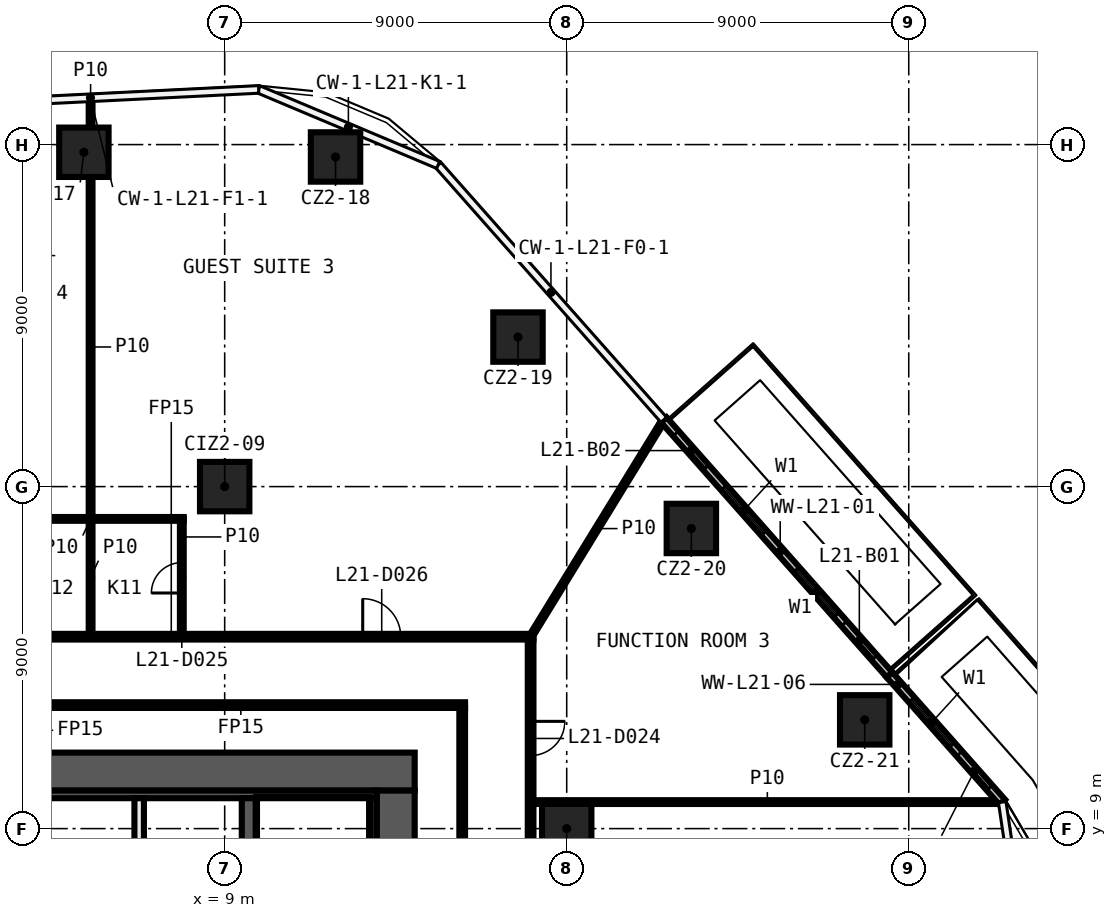
"""IFC4 building model, lengths in metres.
Left out: names, types, materials, properties, quantities, classifications, styles, units other than length and angle.
Written with IfcOpenShell. Run it as: python <this file> out.ifc"""

import sys

from ifc_helpers import new_model, si_unit, direction, frame, frame_2d, origin, origin_2d, place, context, subcontext, project, spatial, rectangle, extrude, element, fill, save


model = new_model("IFC4")
c1 = context("Model", 3, precision=1e-05, world=origin(), true_north=direction((0.0, 1.0)))
c2 = subcontext(c1, "Body", "Model", "MODEL_VIEW")
j1 = project(units=[si_unit("LENGTHUNIT", "METRE"), si_unit("PLANEANGLEUNIT", "RADIAN")], contexts=[c1])
p1 = place(None, origin())
s1 = spatial("IfcSite", under=j1, at=p1, CompositionType="ELEMENT")
p2 = place(p1, origin())
s2 = spatial("IfcBuilding", under=s1, at=p2, CompositionType="ELEMENT")
p3 = place(p2, frame((0.0, 0.0, 102.6)))
s3 = spatial("IfcBuildingStorey", under=s2, at=p3, CompositionType="ELEMENT", Elevation=102.6)
for number, where, z_axis, x_axis in (
    (1, (5.295, 26.798, 0.0), (0.0, 0.0, 1.0), (1.0, 0.0, 0.0)),
    (2, (11.917, 26.674, 0.0), (0.0, 0.0, 1.0), (1.0, 0.0, 0.0)),
    (3, (16.718, 21.935, 0.0), (0.0, 0.0, 1.0), (1.0, 0.0, 0.0)),
    (4, (21.28, 16.898, 0.0), (0.0, 0.0, 1.0), (1.0, 0.0, 0.0)),
    (5, (25.841, 11.862, 0.0), (0.0, 0.0, 1.0), (1.0, 0.0, 0.0)),
    (6, (9.0, 18.0, 0.0), (0.0, 0.0, 1.0), (1.0, 0.0, 0.0)),
    (7, (18.0, 9.0, 0.0), (0.0, 0.0, 1.0), (1.0, 0.0, 0.0)),
):
    element("IfcColumn", number, at=place(p3, frame(where, z_axis=z_axis, x_axis=x_axis)), inside=s3, PredefinedType="COLUMN", context=c2, shape_type="SweptSolid", body=[
        extrude(rectangle(XDim=1.3, YDim=1.3, at=origin_2d()), origin(), (0.0, 0.0, 1.0), 3.3),
    ])
p4 = place(p3, frame((17.125, 9.698, 0.0), z_axis=(0.0, 0.0, 1.0), x_axis=(1.0, 0.0, 0.0)))
e8 = element("IfcWall", 8, at=p4, inside=s3, PredefinedType="PARTITIONING", context=c2, shape_type="SweptSolid", body=[
    extrude(rectangle(XDim=12.308, YDim=0.1, at=frame_2d((6.154, 0.0))), origin(), (0.0, 0.0, 1.0), 3.3),
])
p5 = place(p3, frame((3.525, 12.25, 0.0), z_axis=(0.0, 0.0, 1.0), x_axis=(1.0, 0.0, 0.0)))
e9 = element("IfcWall", 9, at=p5, inside=s3, PredefinedType="PARTITIONING", context=c2, shape_type="SweptSolid", body=[
    extrude(rectangle(XDim=11.8, YDim=0.15, at=frame_2d((5.9, 0.0))), origin(), (0.0, 0.0, 1.0), 3.3),
])
p6 = place(p3, frame((-17.125, 14.05, 0.0), z_axis=(0.0, 0.0, 1.0), x_axis=(1.0, 0.0, 0.0)))
e10 = element("IfcWall", 10, at=p6, inside=s3, PredefinedType="PARTITIONING", context=c2, shape_type="SweptSolid", body=[
    extrude(rectangle(XDim=34.25, YDim=0.15, at=frame_2d((17.125, 0.0))), origin(), (0.0, 0.0, 1.0), 3.3),
])
p7 = place(p6, frame((29.757, 0.0, 0.0)))
e11 = element("IfcOpeningElement", 11, at=p7, cuts=e10, PredefinedType="OPENING", context=c2, shape_type="SweptSolid", body=[
    extrude(rectangle(XDim=1.0, YDim=2.1, at=frame_2d((0.5, 1.05))), frame((0.0, 0.085, 0.0), z_axis=(0.0, -1.0, 0.0), x_axis=(1.0, 0.0, 0.0)), (0.0, 0.0, 1.0), 0.17),
])
p8 = place(p6, frame((18.682, 0.0, 0.0)))
e12 = element("IfcOpeningElement", 12, at=p8, cuts=e10, PredefinedType="OPENING", context=c2, shape_type="SweptSolid", body=[
    extrude(rectangle(XDim=1.0, YDim=2.1, at=frame_2d((0.5, 1.05))), frame((0.0, 0.085, 0.0), z_axis=(0.0, -1.0, 0.0), x_axis=(1.0, 0.0, 0.0)), (0.0, 0.0, 1.0), 0.17),
])
p9 = place(p6, frame((16.654, 0.0, 0.0)))
e13 = element("IfcOpeningElement", 13, at=p9, cuts=e10, PredefinedType="OPENING", context=c2, shape_type="SweptSolid", body=[
    extrude(rectangle(XDim=1.0, YDim=2.1, at=frame_2d((0.5, 1.05))), frame((0.0, 0.085, 0.0), z_axis=(0.0, -1.0, 0.0), x_axis=(1.0, 0.0, 0.0)), (0.0, 0.0, 1.0), 0.17),
])
p10 = place(p6, frame((9.827, 0.0, 0.0)))
e14 = element("IfcOpeningElement", 14, at=p10, cuts=e10, PredefinedType="OPENING", context=c2, shape_type="SweptSolid", body=[
    extrude(rectangle(XDim=1.0, YDim=2.1, at=frame_2d((0.5, 1.05))), frame((0.0, 0.085, 0.0), z_axis=(0.0, -1.0, 0.0), x_axis=(1.0, 0.0, 0.0)), (0.0, 0.0, 1.0), 0.17),
])
p11 = place(p6, frame((7.8, 0.0, 0.0)))
e15 = element("IfcOpeningElement", 15, at=p11, cuts=e10, PredefinedType="OPENING", context=c2, shape_type="SweptSolid", body=[
    extrude(rectangle(XDim=1.0, YDim=2.1, at=frame_2d((0.5, 1.05))), frame((0.0, 0.085, 0.0), z_axis=(0.0, -1.0, 0.0), x_axis=(1.0, 0.0, 0.0)), (0.0, 0.0, 1.0), 0.17),
])
p12 = place(p6, frame((2.56, 0.0, 0.0)))
e16 = element("IfcOpeningElement", 16, at=p12, cuts=e10, PredefinedType="OPENING", context=c2, shape_type="SweptSolid", body=[
    extrude(rectangle(XDim=0.9, YDim=2.1, at=frame_2d((0.45, 1.05))), frame((0.0, 0.085, 0.0), z_axis=(0.0, -1.0, 0.0), x_axis=(1.0, 0.0, 0.0)), (0.0, 0.0, 1.0), 0.17),
])
p13 = place(p3, frame((3.022, 17.15, 0.0), z_axis=(0.0, 0.0, 1.0), x_axis=(1.0, 0.0, 0.0)))
e17 = element("IfcWall", 17, at=p13, inside=s3, PredefinedType="PARTITIONING", context=c2, shape_type="SweptSolid", body=[
    extrude(rectangle(XDim=4.9, YDim=0.1, at=frame_2d((2.45, 0.0))), origin(), (0.0, 0.0, 1.0), 3.3),
])
p14 = place(p3, frame((17.05, 14.05, 0.0), z_axis=(0.0, 0.0, 1.0), x_axis=(0.523105565691, 0.852267896346, 0.0)))
e18 = element("IfcWall", 18, at=p14, inside=s3, PredefinedType="PARTITIONING", context=c2, shape_type="SweptSolid", body=[
    extrude(rectangle(XDim=6.677, YDim=0.1, at=frame_2d((3.338, 0.0))), origin(), (0.0, 0.0, 1.0), 3.3),
])
p15 = place(p3, frame((17.05, 13.975, 0.0), z_axis=(0.0, 0.0, 1.0), x_axis=(0.0, -1.0, 0.0)))
e19 = element("IfcWall", 19, at=p15, inside=s3, PredefinedType="PARTITIONING", context=c2, shape_type="SweptSolid", body=[
    extrude(rectangle(XDim=27.95, YDim=0.15, at=frame_2d((13.975, 0.0))), origin(), (0.0, 0.0, 1.0), 3.3),
])
p16 = place(p15, frame((25.274, 0.0, 0.0)))
e20 = element("IfcOpeningElement", 20, at=p16, cuts=e19, PredefinedType="OPENING", context=c2, shape_type="SweptSolid", body=[
    extrude(rectangle(XDim=0.9, YDim=2.1, at=frame_2d((0.45, 1.05))), frame((0.0, 0.085, 0.0), z_axis=(0.0, -1.0, 0.0), x_axis=(1.0, 0.0, 0.0)), (0.0, 0.0, 1.0), 0.17),
])
p17 = place(p15, frame((18.854, 0.0, 0.0)))
e21 = element("IfcOpeningElement", 21, at=p17, cuts=e19, PredefinedType="OPENING", context=c2, shape_type="SweptSolid", body=[
    extrude(rectangle(XDim=1.0, YDim=2.1, at=frame_2d((0.5, 1.05))), frame((0.0, 0.085, 0.0), z_axis=(0.0, -1.0, 0.0), x_axis=(1.0, 0.0, 0.0)), (0.0, 0.0, 1.0), 0.17),
])
p18 = place(p15, frame((17.299, 0.0, 0.0)))
e22 = element("IfcOpeningElement", 22, at=p18, cuts=e19, PredefinedType="OPENING", context=c2, shape_type="SweptSolid", body=[
    extrude(rectangle(XDim=1.0, YDim=2.1, at=frame_2d((0.5, 1.05))), frame((0.0, 0.085, 0.0), z_axis=(0.0, -1.0, 0.0), x_axis=(1.0, 0.0, 0.0)), (0.0, 0.0, 1.0), 0.17),
])
p19 = place(p15, frame((11.171, 0.0, 0.0)))
e23 = element("IfcOpeningElement", 23, at=p19, cuts=e19, PredefinedType="OPENING", context=c2, shape_type="SweptSolid", body=[
    extrude(rectangle(XDim=0.9, YDim=2.1, at=frame_2d((0.45, 1.05))), frame((0.0, 0.085, 0.0), z_axis=(0.0, -1.0, 0.0), x_axis=(1.0, 0.0, 0.0)), (0.0, 0.0, 1.0), 0.17),
])
p20 = place(p15, frame((7.243, 0.0, 0.0)))
e24 = element("IfcOpeningElement", 24, at=p20, cuts=e19, PredefinedType="OPENING", context=c2, shape_type="SweptSolid", body=[
    extrude(rectangle(XDim=0.9, YDim=2.1, at=frame_2d((0.45, 1.05))), frame((0.0, 0.085, 0.0), z_axis=(0.0, -1.0, 0.0), x_axis=(1.0, 0.0, 0.0)), (0.0, 0.0, 1.0), 0.17),
])
p21 = place(p15, frame((2.153, 0.0, 0.0)))
e25 = element("IfcOpeningElement", 25, at=p21, cuts=e19, PredefinedType="OPENING", context=c2, shape_type="SweptSolid", body=[
    extrude(rectangle(XDim=0.9, YDim=2.1, at=frame_2d((0.45, 1.05))), frame((0.0, 0.085, 0.0), z_axis=(0.0, -1.0, 0.0), x_axis=(1.0, 0.0, 0.0)), (0.0, 0.0, 1.0), 0.17),
])
p22 = place(p3, frame((15.25, -12.175, 0.0), z_axis=(0.0, 0.0, 1.0), x_axis=(0.0, 1.0, 0.0)))
e26 = element("IfcWall", 26, at=p22, inside=s3, PredefinedType="PARTITIONING", context=c2, shape_type="SweptSolid", body=[
    extrude(rectangle(XDim=24.35, YDim=0.15, at=frame_2d((12.175, 0.0))), origin(), (0.0, 0.0, 1.0), 3.3),
])
p23 = place(p22, frame((11.725, 0.0, 0.0)))
e27 = element("IfcOpeningElement", 27, at=p23, cuts=e26, PredefinedType="OPENING", context=c2, shape_type="SweptSolid", body=[
    extrude(rectangle(XDim=0.9, YDim=2.1, at=frame_2d((0.45, 1.05))), frame((0.0, 0.085, 0.0), z_axis=(0.0, -1.0, 0.0), x_axis=(1.0, 0.0, 0.0)), (0.0, 0.0, 1.0), 0.17),
])
p24 = place(p3, frame((7.872, 14.125, 0.0), z_axis=(0.0, 0.0, 1.0), x_axis=(0.0, 1.0, 0.0)))
e28 = element("IfcWall", 28, at=p24, inside=s3, PredefinedType="PARTITIONING", context=c2, shape_type="SweptSolid", body=[
    extrude(rectangle(XDim=3.025, YDim=0.1, at=frame_2d((1.512, 0.0))), origin(), (0.0, 0.0, 1.0), 3.3),
])
p25 = place(p24, frame((1.075, 0.0, 0.0)))
e29 = element("IfcOpeningElement", 29, at=p25, cuts=e28, PredefinedType="OPENING", context=c2, shape_type="SweptSolid", body=[
    extrude(rectangle(XDim=0.8, YDim=2.1, at=frame_2d((0.4, 1.05))), frame((0.0, 0.06, 0.0), z_axis=(0.0, -1.0, 0.0), x_axis=(1.0, 0.0, 0.0)), (0.0, 0.0, 1.0), 0.12),
])
p26 = place(p3, frame((5.472, 14.125, 0.0), z_axis=(0.0, 0.0, 1.0), x_axis=(0.0, 1.0, 0.0)))
e30 = element("IfcWall", 30, at=p26, inside=s3, PredefinedType="PARTITIONING", context=c2, shape_type="SweptSolid", body=[
    extrude(rectangle(XDim=2.975, YDim=0.1, at=frame_2d((1.488, 0.0))), origin(), (0.0, 0.0, 1.0), 3.3),
])
p27 = place(p3, frame((5.472, 17.2, 0.0), z_axis=(0.0, 0.0, 1.0), x_axis=(0.0, 1.0, 0.0)))
e31 = element("IfcWall", 31, at=p27, inside=s3, PredefinedType="PARTITIONING", context=c2, shape_type="SweptSolid", body=[
    extrude(rectangle(XDim=8.948, YDim=0.1, at=frame_2d((4.474, 0.0))), origin(), (0.0, 0.0, 1.0), 3.3),
])
p28 = place(p3, frame((5.472, 27.448, 0.0), z_axis=(0.0, 0.0, 1.0), x_axis=(0.0, 1.0, 0.0)))
e32 = element("IfcWall", 32, at=p28, inside=s3, PredefinedType="PARTITIONING", context=c2, shape_type="SweptSolid", body=[
    extrude(rectangle(XDim=0.764, YDim=0.1, at=frame_2d((0.382, 0.0))), origin(), (0.0, 0.0, 1.0), 3.3),
])
p29 = place(p3, frame((26.495, 13.046, 0.0), z_axis=(0.0, 0.0, 1.0), x_axis=(-0.662851206757, 0.748751145376, 0.0)))
e33 = element("IfcWall", 33, at=p29, inside=s3, PredefinedType="SOLIDWALL", context=c2, shape_type="SweptSolid", body=[
    extrude(rectangle(XDim=8.964, YDim=0.2, at=frame_2d((4.482, 0.0))), origin(), (0.0, 0.0, 1.0), 3.25),
])
p30 = place(p29, frame((2.1, 0.0, 0.6)))
e34 = element("IfcOpeningElement", 34, at=p30, cuts=e33, PredefinedType="OPENING", context=c2, shape_type="SweptSolid", body=[
    extrude(rectangle(XDim=1.6, YDim=2.4, at=frame_2d((0.8, 1.2))), frame((0.0, 0.11, 0.0), z_axis=(0.0, -1.0, 0.0), x_axis=(1.0, 0.0, 0.0)), (0.0, 0.0, 1.0), 0.22),
])
p31 = place(p29, frame((0.6, 0.0, 0.0)))
e35 = element("IfcOpeningElement", 35, at=p31, cuts=e33, PredefinedType="OPENING", context=c2, shape_type="SweptSolid", body=[
    extrude(rectangle(XDim=1.2, YDim=2.4, at=frame_2d((0.6, 1.2))), frame((0.0, 0.11, 0.0), z_axis=(0.0, -1.0, 0.0), x_axis=(1.0, 0.0, 0.0)), (0.0, 0.0, 1.0), 0.22),
])
p32 = place(p29, frame((4.982, 0.0, 0.6)))
e36 = element("IfcOpeningElement", 36, at=p32, cuts=e33, PredefinedType="OPENING", context=c2, shape_type="SweptSolid", body=[
    extrude(rectangle(XDim=1.6, YDim=2.4, at=frame_2d((0.8, 1.2))), frame((0.0, 0.11, 0.0), z_axis=(0.0, -1.0, 0.0), x_axis=(1.0, 0.0, 0.0)), (0.0, 0.0, 1.0), 0.22),
])
p33 = place(p29, frame((7.282, 0.0, 0.0)))
e37 = element("IfcOpeningElement", 37, at=p33, cuts=e33, PredefinedType="OPENING", context=c2, shape_type="SweptSolid", body=[
    extrude(rectangle(XDim=1.2, YDim=2.4, at=frame_2d((0.6, 1.2))), frame((0.0, 0.11, 0.0), z_axis=(0.0, -1.0, 0.0), x_axis=(1.0, 0.0, 0.0)), (0.0, 0.0, 1.0), 0.22),
])
p34 = place(p3, frame((29.46, 9.698, 0.0), z_axis=(0.0, 0.0, 1.0), x_axis=(-0.662868291848, 0.748736020011, 0.0)))
e38 = element("IfcWall", 38, at=p34, inside=s3, PredefinedType="SOLIDWALL", context=c2, shape_type="SweptSolid", body=[
    extrude(rectangle(XDim=4.472, YDim=0.2, at=frame_2d((2.236, 0.0))), origin(), (0.0, 0.0, 1.0), 3.25),
])
p35 = place(p34, frame((2.0, 0.0, 0.6)))
e39 = element("IfcOpeningElement", 39, at=p35, cuts=e38, PredefinedType="OPENING", context=c2, shape_type="SweptSolid", body=[
    extrude(rectangle(XDim=1.6, YDim=2.4, at=frame_2d((0.8, 1.2))), frame((0.0, 0.11, 0.0), z_axis=(0.0, -1.0, 0.0), x_axis=(1.0, 0.0, 0.0)), (0.0, 0.0, 1.0), 0.22),
])
p36 = place(p34, frame((0.5, 0.0, 0.0)))
e40 = element("IfcOpeningElement", 40, at=p36, cuts=e38, PredefinedType="OPENING", context=c2, shape_type="SweptSolid", body=[
    extrude(rectangle(XDim=1.2, YDim=2.4, at=frame_2d((0.6, 1.2))), frame((0.0, 0.11, 0.0), z_axis=(0.0, -1.0, 0.0), x_axis=(1.0, 0.0, 0.0)), (0.0, 0.0, 1.0), 0.22),
])
p37 = place(p3, frame((-14.0, 10.5, 0.0), z_axis=(0.0, 0.0, 1.0), x_axis=(1.0, 0.0, 0.0)))
e41 = element("IfcWall", 41, at=p37, inside=s3, PredefinedType="SHEAR", context=c2, shape_type="SweptSolid", body=[
    extrude(rectangle(XDim=28.0, YDim=1.0, at=frame_2d((14.0, 0.0))), origin(), (0.0, 0.0, 1.0), 3.3),
])
p38 = place(p37, frame((15.9, 0.0, 0.0)))
e42 = element("IfcOpeningElement", 42, at=p38, cuts=e41, PredefinedType="OPENING", context=c2, shape_type="SweptSolid", body=[
    extrude(rectangle(XDim=1.6, YDim=2.1, at=frame_2d((0.8, 1.05))), frame((0.0, 0.51, 0.0), z_axis=(0.0, -1.0, 0.0), x_axis=(1.0, 0.0, 0.0)), (0.0, 0.0, 1.0), 1.02),
])
p39 = place(p3, frame((13.5, 10.0, 0.0), z_axis=(0.0, 0.0, 1.0), x_axis=(0.0, -1.0, 0.0)))
e43 = element("IfcWall", 43, at=p39, inside=s3, PredefinedType="SHEAR", context=c2, shape_type="SweptSolid", body=[
    extrude(rectangle(XDim=20.0, YDim=1.0, at=frame_2d((10.0, 0.0))), origin(), (0.0, 0.0, 1.0), 3.3),
])
p40 = place(p3, frame((3.9, 9.9, 0.0), z_axis=(0.0, 0.0, 1.0), x_axis=(1.0, 0.0, 0.0)))
e44 = element("IfcWall", 44, at=p40, inside=s3, PredefinedType="SHEAR", context=c2, shape_type="SweptSolid", body=[
    extrude(rectangle(XDim=9.1, YDim=0.2, at=frame_2d((4.55, 0.0))), origin(), (0.0, 0.0, 1.0), 3.3),
])
p41 = place(p3, frame((12.9, 9.8, 0.0), z_axis=(0.0, 0.0, 1.0), x_axis=(0.0, -1.0, 0.0)))
e45 = element("IfcWall", 45, at=p41, inside=s3, PredefinedType="SHEAR", context=c2, shape_type="SweptSolid", body=[
    extrude(rectangle(XDim=19.6, YDim=0.2, at=frame_2d((9.8, 0.0))), origin(), (0.0, 0.0, 1.0), 3.3),
])
p42 = place(p3, frame((9.65, 9.8, 0.0), z_axis=(0.0, 0.0, 1.0), x_axis=(0.0, -1.0, 0.0)))
e46 = element("IfcWall", 46, at=p42, inside=s3, PredefinedType="SHEAR", context=c2, shape_type="SweptSolid", body=[
    extrude(rectangle(XDim=7.5, YDim=0.4, at=frame_2d((3.75, 0.0))), origin(), (0.0, 0.0, 1.0), 3.3),
])
p43 = place(p42, frame((5.1, 0.0, 0.0)))
e47 = element("IfcOpeningElement", 47, at=p43, cuts=e46, PredefinedType="OPENING", context=c2, shape_type="SweptSolid", body=[
    extrude(rectangle(XDim=1.2, YDim=2.1, at=frame_2d((0.6, 1.05))), frame((0.0, 0.21, 0.0), z_axis=(0.0, -1.0, 0.0), x_axis=(1.0, 0.0, 0.0)), (0.0, 0.0, 1.0), 0.42),
])
p44 = place(p3, frame((6.75, 7.075, 0.0), z_axis=(0.0, 0.0, 1.0), x_axis=(0.0, 1.0, 0.0)))
e48 = element("IfcWall", 48, at=p44, inside=s3, PredefinedType="SOLIDWALL", context=c2, shape_type="SweptSolid", body=[
    extrude(rectangle(XDim=2.725, YDim=0.25, at=frame_2d((1.363, 0.0))), origin(), (0.0, 0.0, 1.0), 3.3),
])
p45 = place(p21, origin())
e49 = element("IfcDoor", 49, at=p45, inside=s3, OperationType="SINGLE_SWING_RIGHT", PredefinedType="DOOR", context=c2, shape_type="SweptSolid", body=[
    extrude(rectangle(XDim=0.9, YDim=2.1, at=frame_2d((0.45, 1.05))), frame((0.0, 0.025, 0.0), z_axis=(0.0, -1.0, 0.0), x_axis=(1.0, 0.0, 0.0)), (0.0, 0.0, 1.0), 0.05),
])
fill(e25, e49)
p46 = place(p25, origin())
e50 = element("IfcDoor", 50, at=p46, inside=s3, OperationType="SINGLE_SWING_RIGHT", PredefinedType="DOOR", context=c2, shape_type="SweptSolid", body=[
    extrude(rectangle(XDim=0.8, YDim=2.1, at=frame_2d((0.4, 1.05))), frame((0.0, 0.025, 0.0), z_axis=(0.0, -1.0, 0.0), x_axis=(1.0, 0.0, 0.0)), (0.0, 0.0, 1.0), 0.05),
])
fill(e29, e50)
p47 = place(p7, origin())
e51 = element("IfcDoor", 51, at=p47, inside=s3, OperationType="SINGLE_SWING_LEFT", PredefinedType="DOOR", context=c2, shape_type="SweptSolid", body=[
    extrude(rectangle(XDim=1.0, YDim=2.1, at=frame_2d((0.5, 1.05))), frame((0.0, 0.025, 0.0), z_axis=(0.0, -1.0, 0.0), x_axis=(1.0, 0.0, 0.0)), (0.0, 0.0, 1.0), 0.05),
])
fill(e11, e51)
p48 = place(p30, origin())
e52 = element("IfcWindow", 52, at=p48, inside=s3, PartitioningType="SINGLE_PANEL", PredefinedType="WINDOW", context=c2, shape_type="SweptSolid", body=[
    extrude(rectangle(XDim=1.6, YDim=2.4, at=frame_2d((0.8, 1.2))), frame((0.0, 0.03, 0.0), z_axis=(0.0, -1.0, 0.0), x_axis=(1.0, 0.0, 0.0)), (0.0, 0.0, 1.0), 0.06),
])
fill(e34, e52)
p49 = place(p31, origin())
e53 = element("IfcDoor", 53, at=p49, inside=s3, OperationType="SLIDING_TO_LEFT", PredefinedType="DOOR", context=c2, shape_type="SweptSolid", body=[
    extrude(rectangle(XDim=1.2, YDim=2.4, at=frame_2d((0.6, 1.2))), frame((0.0, 0.025, 0.0), z_axis=(0.0, -1.0, 0.0), x_axis=(1.0, 0.0, 0.0)), (0.0, 0.0, 1.0), 0.05),
])
fill(e35, e53)
p50 = place(p32, origin())
e54 = element("IfcWindow", 54, at=p50, inside=s3, PartitioningType="SINGLE_PANEL", PredefinedType="WINDOW", context=c2, shape_type="SweptSolid", body=[
    extrude(rectangle(XDim=1.6, YDim=2.4, at=frame_2d((0.8, 1.2))), frame((0.0, 0.03, 0.0), z_axis=(0.0, -1.0, 0.0), x_axis=(1.0, 0.0, 0.0)), (0.0, 0.0, 1.0), 0.06),
])
fill(e36, e54)
p51 = place(p33, origin())
e55 = element("IfcDoor", 55, at=p51, inside=s3, OperationType="SLIDING_TO_LEFT", PredefinedType="DOOR", context=c2, shape_type="SweptSolid", body=[
    extrude(rectangle(XDim=1.2, YDim=2.4, at=frame_2d((0.6, 1.2))), frame((0.0, 0.025, 0.0), z_axis=(0.0, -1.0, 0.0), x_axis=(1.0, 0.0, 0.0)), (0.0, 0.0, 1.0), 0.05),
])
fill(e37, e55)
p52 = place(p35, origin())
e56 = element("IfcWindow", 56, at=p52, inside=s3, PartitioningType="SINGLE_PANEL", PredefinedType="WINDOW", context=c2, shape_type="SweptSolid", body=[
    extrude(rectangle(XDim=1.6, YDim=2.4, at=frame_2d((0.8, 1.2))), frame((0.0, 0.03, 0.0), z_axis=(0.0, -1.0, 0.0), x_axis=(1.0, 0.0, 0.0)), (0.0, 0.0, 1.0), 0.06),
])
fill(e39, e56)
p53 = place(p36, origin())
e57 = element("IfcDoor", 57, at=p53, inside=s3, OperationType="SLIDING_TO_LEFT", PredefinedType="DOOR", context=c2, shape_type="SweptSolid", body=[
    extrude(rectangle(XDim=1.2, YDim=2.4, at=frame_2d((0.6, 1.2))), frame((0.0, 0.025, 0.0), z_axis=(0.0, -1.0, 0.0), x_axis=(1.0, 0.0, 0.0)), (0.0, 0.0, 1.0), 0.05),
])
fill(e40, e57)
save(model, sys.argv[1])
